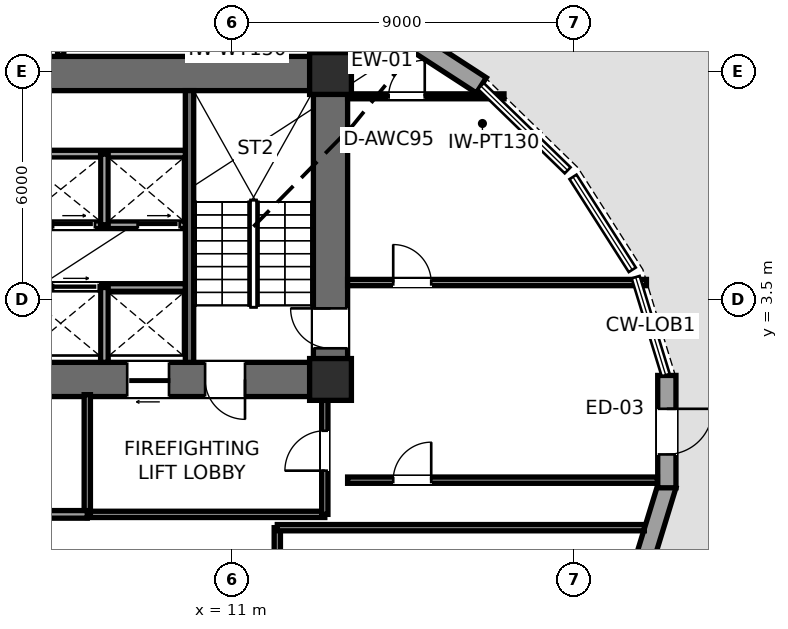
"""IFC4 building model, lengths in metres.
Left out: names, types, materials, properties, quantities, classifications, styles, units other than length and angle.
Written with IfcOpenShell. Run it as: python <this file> out.ifc"""

import sys

from ifc_helpers import new_model, si_unit, direction, frame, frame_2d, origin, origin_2d, place, context, subcontext, project, spatial, rectangle, extrude, element, fill, save


model = new_model("IFC4")
c1 = context("Model", 3, precision=1e-05, world=origin(), true_north=direction((0.0, 1.0)))
c2 = subcontext(c1, "Body", "Model", "MODEL_VIEW")
j1 = project(units=[si_unit("LENGTHUNIT", "METRE"), si_unit("PLANEANGLEUNIT", "RADIAN")], contexts=[c1])
p1 = place(None, origin())
s1 = spatial("IfcSite", under=j1, at=p1, CompositionType="ELEMENT")
p2 = place(p1, origin())
s2 = spatial("IfcBuilding", under=s1, at=p2, CompositionType="ELEMENT")
p3 = place(p2, origin())
s3 = spatial("IfcBuildingStorey", under=s2, at=p3, CompositionType="ELEMENT", Elevation=0.0)
p4 = place(p3, frame((13.6, 0.95, 0.0), z_axis=(0.0, 0.0, 1.0), x_axis=(0.0, 1.0, 0.0)))
e1 = element("IfcWall", 1, at=p4, inside=s3, PredefinedType="SHEAR", context=c2, shape_type="SweptSolid", body=[
    extrude(rectangle(XDim=8.95, YDim=0.9, at=frame_2d((4.475, 0.0))), origin(), (0.0, 0.0, 1.0), 6.0),
])
p5 = place(p4, frame((1.27, 0.0, 0.0)))
e2 = element("IfcOpeningElement", 2, at=p5, cuts=e1, PredefinedType="OPENING", context=c2, shape_type="SweptSolid", body=[
    extrude(rectangle(XDim=1.05, YDim=2.15, at=frame_2d((0.525, 1.075))), frame((0.0, 0.46, 0.0), z_axis=(0.0, -1.0, 0.0), x_axis=(1.0, 0.0, 0.0)), (0.0, 0.0, 1.0), 0.92),
])
p6 = place(p3, frame((4.35, 9.45, 0.0), z_axis=(0.0, 0.0, 1.0), x_axis=(1.0, 0.0, 0.0)))
e3 = element("IfcWall", 3, at=p6, inside=s3, PredefinedType="SHEAR", context=c2, shape_type="SweptSolid", body=[
    extrude(rectangle(XDim=9.7, YDim=0.9, at=frame_2d((4.85, 0.0))), origin(), (0.0, 0.0, 1.0), 6.0),
])
p7 = place(p3, frame((14.05, 1.4, 0.0), z_axis=(0.0, 0.0, 1.0), x_axis=(-1.0, 0.0, 0.0)))
e4 = element("IfcWall", 4, at=p7, inside=s3, PredefinedType="SHEAR", context=c2, shape_type="SweptSolid", body=[
    extrude(rectangle(XDim=9.3, YDim=0.9, at=frame_2d((4.65, 0.0))), origin(), (0.0, 0.0, 1.0), 6.0),
])
p8 = place(p7, frame((2.7, 0.0, 0.0)))
e5 = element("IfcOpeningElement", 5, at=p8, cuts=e4, PredefinedType="OPENING", context=c2, shape_type="SweptSolid", body=[
    extrude(rectangle(XDim=1.05, YDim=2.15, at=frame_2d((0.525, 1.075))), frame((0.0, 0.46, 0.0), z_axis=(0.0, -1.0, 0.0), x_axis=(1.0, 0.0, 0.0)), (0.0, 0.0, 1.0), 0.92),
])
p9 = place(p7, frame((4.7, 0.0, 0.0)))
e6 = element("IfcOpeningElement", 6, at=p9, cuts=e4, PredefinedType="OPENING", context=c2, shape_type="SweptSolid", body=[
    extrude(rectangle(XDim=1.1, YDim=2.2, at=frame_2d((0.55, 1.1))), frame((0.0, 0.46, 0.0), z_axis=(0.0, -1.0, 0.0), x_axis=(1.0, 0.0, 0.0)), (0.0, 0.0, 1.0), 0.92),
])
p10 = place(p3, frame((9.89, 1.85, 0.0), z_axis=(0.0, 0.0, 1.0), x_axis=(0.0, 1.0, 0.0)))
e7 = element("IfcWall", 7, at=p10, inside=s3, PredefinedType="SHEAR", context=c2, shape_type="SweptSolid", body=[
    extrude(rectangle(XDim=7.15, YDim=0.22, at=frame_2d((3.575, 0.0))), origin(), (0.0, 0.0, 1.0), 6.0),
])
for number, where, z_axis, x_axis in (
    (8, (13.6, 1.4, 0.0), (0.0, 0.0, 1.0), (1.0, 0.0, 0.0)),
    (9, (13.6, 9.45, 0.0), (0.0, 0.0, 1.0), (1.0, 0.0, 0.0)),
):
    element("IfcColumn", number, at=place(p3, frame(where, z_axis=z_axis, x_axis=x_axis)), inside=s3, PredefinedType="COLUMN", context=c2, shape_type="SweptSolid", body=[
        extrude(rectangle(XDim=1.1, YDim=1.1, at=origin_2d()), origin(), (0.0, 0.0, 1.0), 6.0),
    ])
p11 = place(p3, frame((14.333, 11.239, 0.0), z_axis=(0.0, 0.0, 1.0), x_axis=(0.838764450243, -0.54449444167, 0.0)))
e10 = element("IfcWall", 10, at=p11, inside=s3, PredefinedType="STANDARD", context=c2, shape_type="SweptSolid", body=[
    extrude(rectangle(XDim=3.858, YDim=0.48, at=frame_2d((1.929, 0.0))), origin(), (0.0, 0.0, 1.0), 4.913),
])
p12 = place(p3, frame((22.461, -1.38, 0.0), z_axis=(0.0, 0.0, 1.0), x_axis=(-0.29302499195, -0.956104781963, 0.0)))
e11 = element("IfcWall", 11, at=p12, inside=s3, PredefinedType="STANDARD", context=c2, shape_type="SweptSolid", body=[
    extrude(rectangle(XDim=2.976, YDim=0.48, at=frame_2d((1.488, 0.0))), origin(), (0.0, 0.0, 1.0), 4.913),
])
p13 = place(p3, frame((22.45, 1.506, 0.0), z_axis=(0.0, 0.0, 1.0), x_axis=(0.0, -1.0, 0.0)))
e12 = element("IfcWall", 12, at=p13, inside=s3, PredefinedType="STANDARD", context=c2, shape_type="SweptSolid", body=[
    extrude(rectangle(XDim=2.956, YDim=0.48, at=frame_2d((1.478, 0.0))), origin(), (0.0, 0.0, 1.0), 4.913),
])
p14 = place(p13, frame((0.878, 0.0, 0.0)))
e13 = element("IfcOpeningElement", 13, at=p14, cuts=e12, PredefinedType="OPENING", context=c2, shape_type="SweptSolid", body=[
    extrude(rectangle(XDim=1.2, YDim=2.2, at=frame_2d((0.6, 1.1))), frame((0.0, 0.25, 0.0), z_axis=(0.0, -1.0, 0.0), x_axis=(1.0, 0.0, 0.0)), (0.0, 0.0, 1.0), 0.5),
])
p15 = place(p3, frame((7.2, -2.15, 0.0), z_axis=(0.0, 0.0, 1.0), x_axis=(1.0, 0.0, 0.0)))
e14 = element("IfcWall", 14, at=p15, inside=s3, PredefinedType="PARTITIONING", context=c2, shape_type="SweptSolid", body=[
    extrude(rectangle(XDim=6.25, YDim=0.165, at=frame_2d((3.125, 0.0))), origin(), (0.0, 0.0, 1.0), 5.78),
])
p16 = place(p3, frame((7.2, -2.15, 0.0), z_axis=(0.0, 0.0, 1.0), x_axis=(0.0, 1.0, 0.0)))
e15 = element("IfcWall", 15, at=p16, inside=s3, PredefinedType="PARTITIONING", context=c2, shape_type="SweptSolid", body=[
    extrude(rectangle(XDim=3.15, YDim=0.165, at=frame_2d((1.575, 0.0))), origin(), (0.0, 0.0, 1.0), 5.78),
])
p17 = place(p3, frame((13.45, -2.15, 0.0), z_axis=(0.0, 0.0, 1.0), x_axis=(0.0, 1.0, 0.0)))
e16 = element("IfcWall", 16, at=p17, inside=s3, PredefinedType="PARTITIONING", context=c2, shape_type="SweptSolid", body=[
    extrude(rectangle(XDim=3.15, YDim=0.165, at=frame_2d((1.575, 0.0))), origin(), (0.0, 0.0, 1.0), 5.233),
])
p18 = place(p17, frame((1.15, 0.0, 0.0)))
e17 = element("IfcOpeningElement", 17, at=p18, cuts=e16, PredefinedType="OPENING", context=c2, shape_type="SweptSolid", body=[
    extrude(rectangle(XDim=1.05, YDim=2.15, at=frame_2d((0.525, 1.075))), frame((0.0, 0.093, 0.0), z_axis=(0.0, -1.0, 0.0), x_axis=(1.0, 0.0, 0.0)), (0.0, 0.0, 1.0), 0.185),
])
p19 = place(p3, frame((4.95, -2.15, 0.0), z_axis=(0.0, 0.0, 1.0), x_axis=(1.0, 0.0, 0.0)))
e18 = element("IfcWall", 18, at=p19, inside=s3, PredefinedType="SOLIDWALL", context=c2, shape_type="SweptSolid", body=[
    extrude(rectangle(XDim=2.25, YDim=0.2, at=frame_2d((1.125, 0.0))), origin(), (0.0, 0.0, 1.0), 5.78),
])
p20 = place(p3, frame((5.65, 3.82, 0.0), z_axis=(0.0, 0.0, 1.0), x_axis=(1.0, 0.0, 0.0)))
e19 = element("IfcWall", 19, at=p20, inside=s3, PredefinedType="SOLIDWALL", context=c2, shape_type="SweptSolid", body=[
    extrude(rectangle(XDim=4.13, YDim=0.2, at=frame_2d((2.065, 0.0))), origin(), (0.0, 0.0, 1.0), 5.78),
])
p21 = place(p20, frame((0.65, 0.0, 0.0)))
e20 = element("IfcOpeningElement", 20, at=p21, cuts=e19, PredefinedType="OPENING", context=c2, shape_type="SweptSolid", body=[
    extrude(rectangle(XDim=1.2, YDim=2.2, at=frame_2d((0.6, 1.1))), frame((0.0, 0.11, 0.0), z_axis=(0.0, -1.0, 0.0), x_axis=(1.0, 0.0, 0.0)), (0.0, 0.0, 1.0), 0.22),
])
p22 = place(p3, frame((7.65, 1.85, 0.0), z_axis=(0.0, 0.0, 1.0), x_axis=(0.0, 1.0, 0.0)))
e21 = element("IfcWall", 21, at=p22, inside=s3, PredefinedType="SOLIDWALL", context=c2, shape_type="SweptSolid", body=[
    extrude(rectangle(XDim=1.97, YDim=0.2, at=frame_2d((0.985, 0.0))), origin(), (0.0, 0.0, 1.0), 5.78),
])
p23 = place(p3, frame((5.65, 5.47, 0.0), z_axis=(0.0, 0.0, 1.0), x_axis=(1.0, 0.0, 0.0)))
e22 = element("IfcWall", 22, at=p23, inside=s3, PredefinedType="SOLIDWALL", context=c2, shape_type="SweptSolid", body=[
    extrude(rectangle(XDim=4.13, YDim=0.2, at=frame_2d((2.065, 0.0))), origin(), (0.0, 0.0, 1.0), 5.78),
])
p24 = place(p23, frame((0.65, 0.0, 0.0)))
e23 = element("IfcOpeningElement", 23, at=p24, cuts=e22, PredefinedType="OPENING", context=c2, shape_type="SweptSolid", body=[
    extrude(rectangle(XDim=1.1, YDim=2.2, at=frame_2d((0.55, 1.1))), frame((0.0, 0.11, 0.0), z_axis=(0.0, -1.0, 0.0), x_axis=(1.0, 0.0, 0.0)), (0.0, 0.0, 1.0), 0.22),
])
p25 = place(p23, frame((2.88, 0.0, 0.0)))
e24 = element("IfcOpeningElement", 24, at=p25, cuts=e22, PredefinedType="OPENING", context=c2, shape_type="SweptSolid", body=[
    extrude(rectangle(XDim=1.1, YDim=2.2, at=frame_2d((0.55, 1.1))), frame((0.0, 0.11, 0.0), z_axis=(0.0, -1.0, 0.0), x_axis=(1.0, 0.0, 0.0)), (0.0, 0.0, 1.0), 0.22),
])
p26 = place(p3, frame((5.65, 7.33, 0.0), z_axis=(0.0, 0.0, 1.0), x_axis=(1.0, 0.0, 0.0)))
e25 = element("IfcWall", 25, at=p26, inside=s3, PredefinedType="SOLIDWALL", context=c2, shape_type="SweptSolid", body=[
    extrude(rectangle(XDim=4.13, YDim=0.2, at=frame_2d((2.065, 0.0))), origin(), (0.0, 0.0, 1.0), 5.78),
])
p27 = place(p3, frame((7.65, 5.47, 0.0), z_axis=(0.0, 0.0, 1.0), x_axis=(0.0, 1.0, 0.0)))
e26 = element("IfcWall", 26, at=p27, inside=s3, PredefinedType="SOLIDWALL", context=c2, shape_type="SweptSolid", body=[
    extrude(rectangle(XDim=1.86, YDim=0.2, at=frame_2d((0.93, 0.0))), origin(), (0.0, 0.0, 1.0), 5.78),
])
p28 = place(p3, frame((12.2, -12.32, 0.0), z_axis=(0.0, 0.0, 1.0), x_axis=(0.0, 1.0, 0.0)))
e27 = element("IfcWall", 27, at=p28, inside=s3, PredefinedType="PARTITIONING", context=c2, shape_type="SweptSolid", body=[
    extrude(rectangle(XDim=9.82, YDim=0.165, at=frame_2d((4.91, 0.0))), origin(), (0.0, 0.0, 1.0), 5.78),
])
p29 = place(p28, frame((2.5, 0.0, 0.0)))
e28 = element("IfcOpeningElement", 28, at=p29, cuts=e27, PredefinedType="OPENING", context=c2, shape_type="SweptSolid", body=[
    extrude(rectangle(XDim=0.9, YDim=2.1, at=frame_2d((0.45, 1.05))), frame((0.0, 0.093, 0.0), z_axis=(0.0, -1.0, 0.0), x_axis=(1.0, 0.0, 0.0)), (0.0, 0.0, 1.0), 0.185),
])
p30 = place(p3, frame((12.2, -2.5, 0.0), z_axis=(0.0, 0.0, 1.0), x_axis=(1.0, 0.0, 0.0)))
e29 = element("IfcWall", 29, at=p30, inside=s3, PredefinedType="PARTITIONING", context=c2, shape_type="SweptSolid", body=[
    extrude(rectangle(XDim=9.658, YDim=0.165, at=frame_2d((4.829, 0.0))), origin(), (0.0, 0.0, 1.0), 5.233),
])
p31 = place(p3, frame((6.5, 9.92, 0.0), z_axis=(0.0, 0.0, 1.0), x_axis=(0.0, 1.0, 0.0)))
e30 = element("IfcWall", 30, at=p31, inside=s3, PredefinedType="PARTITIONING", context=c2, shape_type="SweptSolid", body=[
    extrude(rectangle(XDim=3.766, YDim=0.165, at=frame_2d((1.883, 0.0))), origin(), (0.0, 0.0, 1.0), 5.148),
])
p32 = place(p31, frame((0.35, 0.0, 0.0)))
e31 = element("IfcOpeningElement", 31, at=p32, cuts=e30, PredefinedType="OPENING", context=c2, shape_type="SweptSolid", body=[
    extrude(rectangle(XDim=1.0, YDim=2.15, at=frame_2d((0.5, 1.075))), frame((0.0, 0.093, 0.0), z_axis=(0.0, -1.0, 0.0), x_axis=(1.0, 0.0, 0.0)), (0.0, 0.0, 1.0), 0.185),
])
p33 = place(p3, frame((14.05, -1.25, 0.0), z_axis=(0.0, 0.0, 1.0), x_axis=(1.0, 0.0, 0.0)))
e32 = element("IfcWall", 32, at=p33, inside=s3, PredefinedType="PARTITIONING", context=c2, shape_type="SweptSolid", body=[
    extrude(rectangle(XDim=8.152, YDim=0.165, at=frame_2d((4.076, 0.0))), origin(), (0.0, 0.0, 1.0), 5.148),
])
p34 = place(p33, frame((1.2, 0.0, 0.0)))
e33 = element("IfcOpeningElement", 33, at=p34, cuts=e32, PredefinedType="OPENING", context=c2, shape_type="SweptSolid", body=[
    extrude(rectangle(XDim=1.0, YDim=2.15, at=frame_2d((0.5, 1.075))), frame((0.0, 0.093, 0.0), z_axis=(0.0, -1.0, 0.0), x_axis=(1.0, 0.0, 0.0)), (0.0, 0.0, 1.0), 0.185),
])
p35 = place(p3, frame((14.05, 3.95, 0.0), z_axis=(0.0, 0.0, 1.0), x_axis=(1.0, 0.0, 0.0)))
e34 = element("IfcWall", 34, at=p35, inside=s3, PredefinedType="PARTITIONING", context=c2, shape_type="SweptSolid", body=[
    extrude(rectangle(XDim=7.864, YDim=0.165, at=frame_2d((3.932, 0.0))), origin(), (0.0, 0.0, 1.0), 5.233),
])
p36 = place(p35, frame((1.2, 0.0, 0.0)))
e35 = element("IfcOpeningElement", 35, at=p36, cuts=e34, PredefinedType="OPENING", context=c2, shape_type="SweptSolid", body=[
    extrude(rectangle(XDim=1.0, YDim=2.15, at=frame_2d((0.5, 1.075))), frame((0.0, 0.093, 0.0), z_axis=(0.0, -1.0, 0.0), x_axis=(1.0, 0.0, 0.0)), (0.0, 0.0, 1.0), 0.185),
])
p37 = place(p3, frame((14.05, 8.85, 0.0), z_axis=(0.0, 0.0, 1.0), x_axis=(1.0, 0.0, 0.0)))
e36 = element("IfcWall", 36, at=p37, inside=s3, PredefinedType="PARTITIONING", context=c2, shape_type="SweptSolid", body=[
    extrude(rectangle(XDim=4.115, YDim=0.13, at=frame_2d((2.058, 0.0))), origin(), (0.0, 0.0, 1.0), 5.78),
])
p38 = place(p37, frame((1.08, 0.0, 0.0)))
e37 = element("IfcOpeningElement", 37, at=p38, cuts=e36, PredefinedType="OPENING", context=c2, shape_type="SweptSolid", body=[
    extrude(rectangle(XDim=0.95, YDim=2.15, at=frame_2d((0.475, 1.075))), frame((0.0, 0.075, 0.0), z_axis=(0.0, -1.0, 0.0), x_axis=(1.0, 0.0, 0.0)), (0.0, 0.0, 1.0), 0.15),
])
p39 = place(p14, origin())
e38 = element("IfcDoor", 38, at=p39, inside=s3, OperationType="SINGLE_SWING_LEFT", PredefinedType="DOOR", context=c2, shape_type="SweptSolid", body=[
    extrude(rectangle(XDim=1.2, YDim=2.2, at=frame_2d((0.6, 1.1))), frame((0.0, 0.025, 0.0), z_axis=(0.0, -1.0, 0.0), x_axis=(1.0, 0.0, 0.0)), (0.0, 0.0, 1.0), 0.05),
])
fill(e13, e38)
p40 = place(p8, origin())
e39 = element("IfcDoor", 39, at=p40, inside=s3, OperationType="SINGLE_SWING_LEFT", PredefinedType="DOOR", context=c2, shape_type="SweptSolid", body=[
    extrude(rectangle(XDim=1.05, YDim=2.15, at=frame_2d((0.525, 1.075))), frame((0.0, 0.025, 0.0), z_axis=(0.0, -1.0, 0.0), x_axis=(1.0, 0.0, 0.0)), (0.0, 0.0, 1.0), 0.05),
])
fill(e5, e39)
p41 = place(p5, origin())
e40 = element("IfcDoor", 40, at=p41, inside=s3, OperationType="SINGLE_SWING_RIGHT", PredefinedType="DOOR", context=c2, shape_type="SweptSolid", body=[
    extrude(rectangle(XDim=1.05, YDim=2.15, at=frame_2d((0.525, 1.075))), frame((0.0, 0.025, 0.0), z_axis=(0.0, -1.0, 0.0), x_axis=(1.0, 0.0, 0.0)), (0.0, 0.0, 1.0), 0.05),
])
fill(e2, e40)
p42 = place(p18, origin())
e41 = element("IfcDoor", 41, at=p42, inside=s3, OperationType="SINGLE_SWING_LEFT", PredefinedType="DOOR", context=c2, shape_type="SweptSolid", body=[
    extrude(rectangle(XDim=1.05, YDim=2.15, at=frame_2d((0.525, 1.075))), frame((0.0, 0.025, 0.0), z_axis=(0.0, -1.0, 0.0), x_axis=(1.0, 0.0, 0.0)), (0.0, 0.0, 1.0), 0.05),
])
fill(e17, e41)
p43 = place(p9, origin())
e42 = element("IfcDoor", 42, at=p43, inside=s3, OperationType="SLIDING_TO_LEFT", PredefinedType="DOOR", context=c2, shape_type="SweptSolid", body=[
    extrude(rectangle(XDim=1.1, YDim=2.2, at=frame_2d((0.55, 1.1))), frame((0.0, 0.025, 0.0), z_axis=(0.0, -1.0, 0.0), x_axis=(1.0, 0.0, 0.0)), (0.0, 0.0, 1.0), 0.05),
])
fill(e6, e42)
p44 = place(p21, origin())
e43 = element("IfcDoor", 43, at=p44, inside=s3, OperationType="SLIDING_TO_RIGHT", PredefinedType="DOOR", context=c2, shape_type="SweptSolid", body=[
    extrude(rectangle(XDim=1.2, YDim=2.2, at=frame_2d((0.6, 1.1))), frame((0.0, 0.025, 0.0), z_axis=(0.0, -1.0, 0.0), x_axis=(1.0, 0.0, 0.0)), (0.0, 0.0, 1.0), 0.05),
])
fill(e20, e43)
p45 = place(p24, origin())
e44 = element("IfcDoor", 44, at=p45, inside=s3, OperationType="SLIDING_TO_LEFT", PredefinedType="DOOR", context=c2, shape_type="SweptSolid", body=[
    extrude(rectangle(XDim=1.1, YDim=2.2, at=frame_2d((0.55, 1.1))), frame((0.0, 0.025, 0.0), z_axis=(0.0, -1.0, 0.0), x_axis=(1.0, 0.0, 0.0)), (0.0, 0.0, 1.0), 0.05),
])
fill(e23, e44)
p46 = place(p25, origin())
e45 = element("IfcDoor", 45, at=p46, inside=s3, OperationType="SLIDING_TO_LEFT", PredefinedType="DOOR", context=c2, shape_type="SweptSolid", body=[
    extrude(rectangle(XDim=1.1, YDim=2.2, at=frame_2d((0.55, 1.1))), frame((0.0, 0.025, 0.0), z_axis=(0.0, -1.0, 0.0), x_axis=(1.0, 0.0, 0.0)), (0.0, 0.0, 1.0), 0.05),
])
fill(e24, e45)
p47 = place(p38, origin())
e46 = element("IfcDoor", 46, at=p47, inside=s3, OperationType="SINGLE_SWING_RIGHT", PredefinedType="DOOR", context=c2, shape_type="SweptSolid", body=[
    extrude(rectangle(XDim=0.95, YDim=2.15, at=frame_2d((0.475, 1.075))), frame((0.0, 0.025, 0.0), z_axis=(0.0, -1.0, 0.0), x_axis=(1.0, 0.0, 0.0)), (0.0, 0.0, 1.0), 0.05),
])
fill(e37, e46)
p48 = place(p36, origin())
e47 = element("IfcDoor", 47, at=p48, inside=s3, OperationType="SINGLE_SWING_LEFT", PredefinedType="DOOR", context=c2, shape_type="SweptSolid", body=[
    extrude(rectangle(XDim=1.0, YDim=2.15, at=frame_2d((0.5, 1.075))), frame((0.0, 0.025, 0.0), z_axis=(0.0, -1.0, 0.0), x_axis=(1.0, 0.0, 0.0)), (0.0, 0.0, 1.0), 0.05),
])
fill(e35, e47)
p49 = place(p34, origin())
e48 = element("IfcDoor", 48, at=p49, inside=s3, OperationType="SINGLE_SWING_RIGHT", PredefinedType="DOOR", context=c2, shape_type="SweptSolid", body=[
    extrude(rectangle(XDim=1.0, YDim=2.15, at=frame_2d((0.5, 1.075))), frame((0.0, 0.025, 0.0), z_axis=(0.0, -1.0, 0.0), x_axis=(1.0, 0.0, 0.0)), (0.0, 0.0, 1.0), 0.05),
])
fill(e33, e48)
save(model, sys.argv[1])
